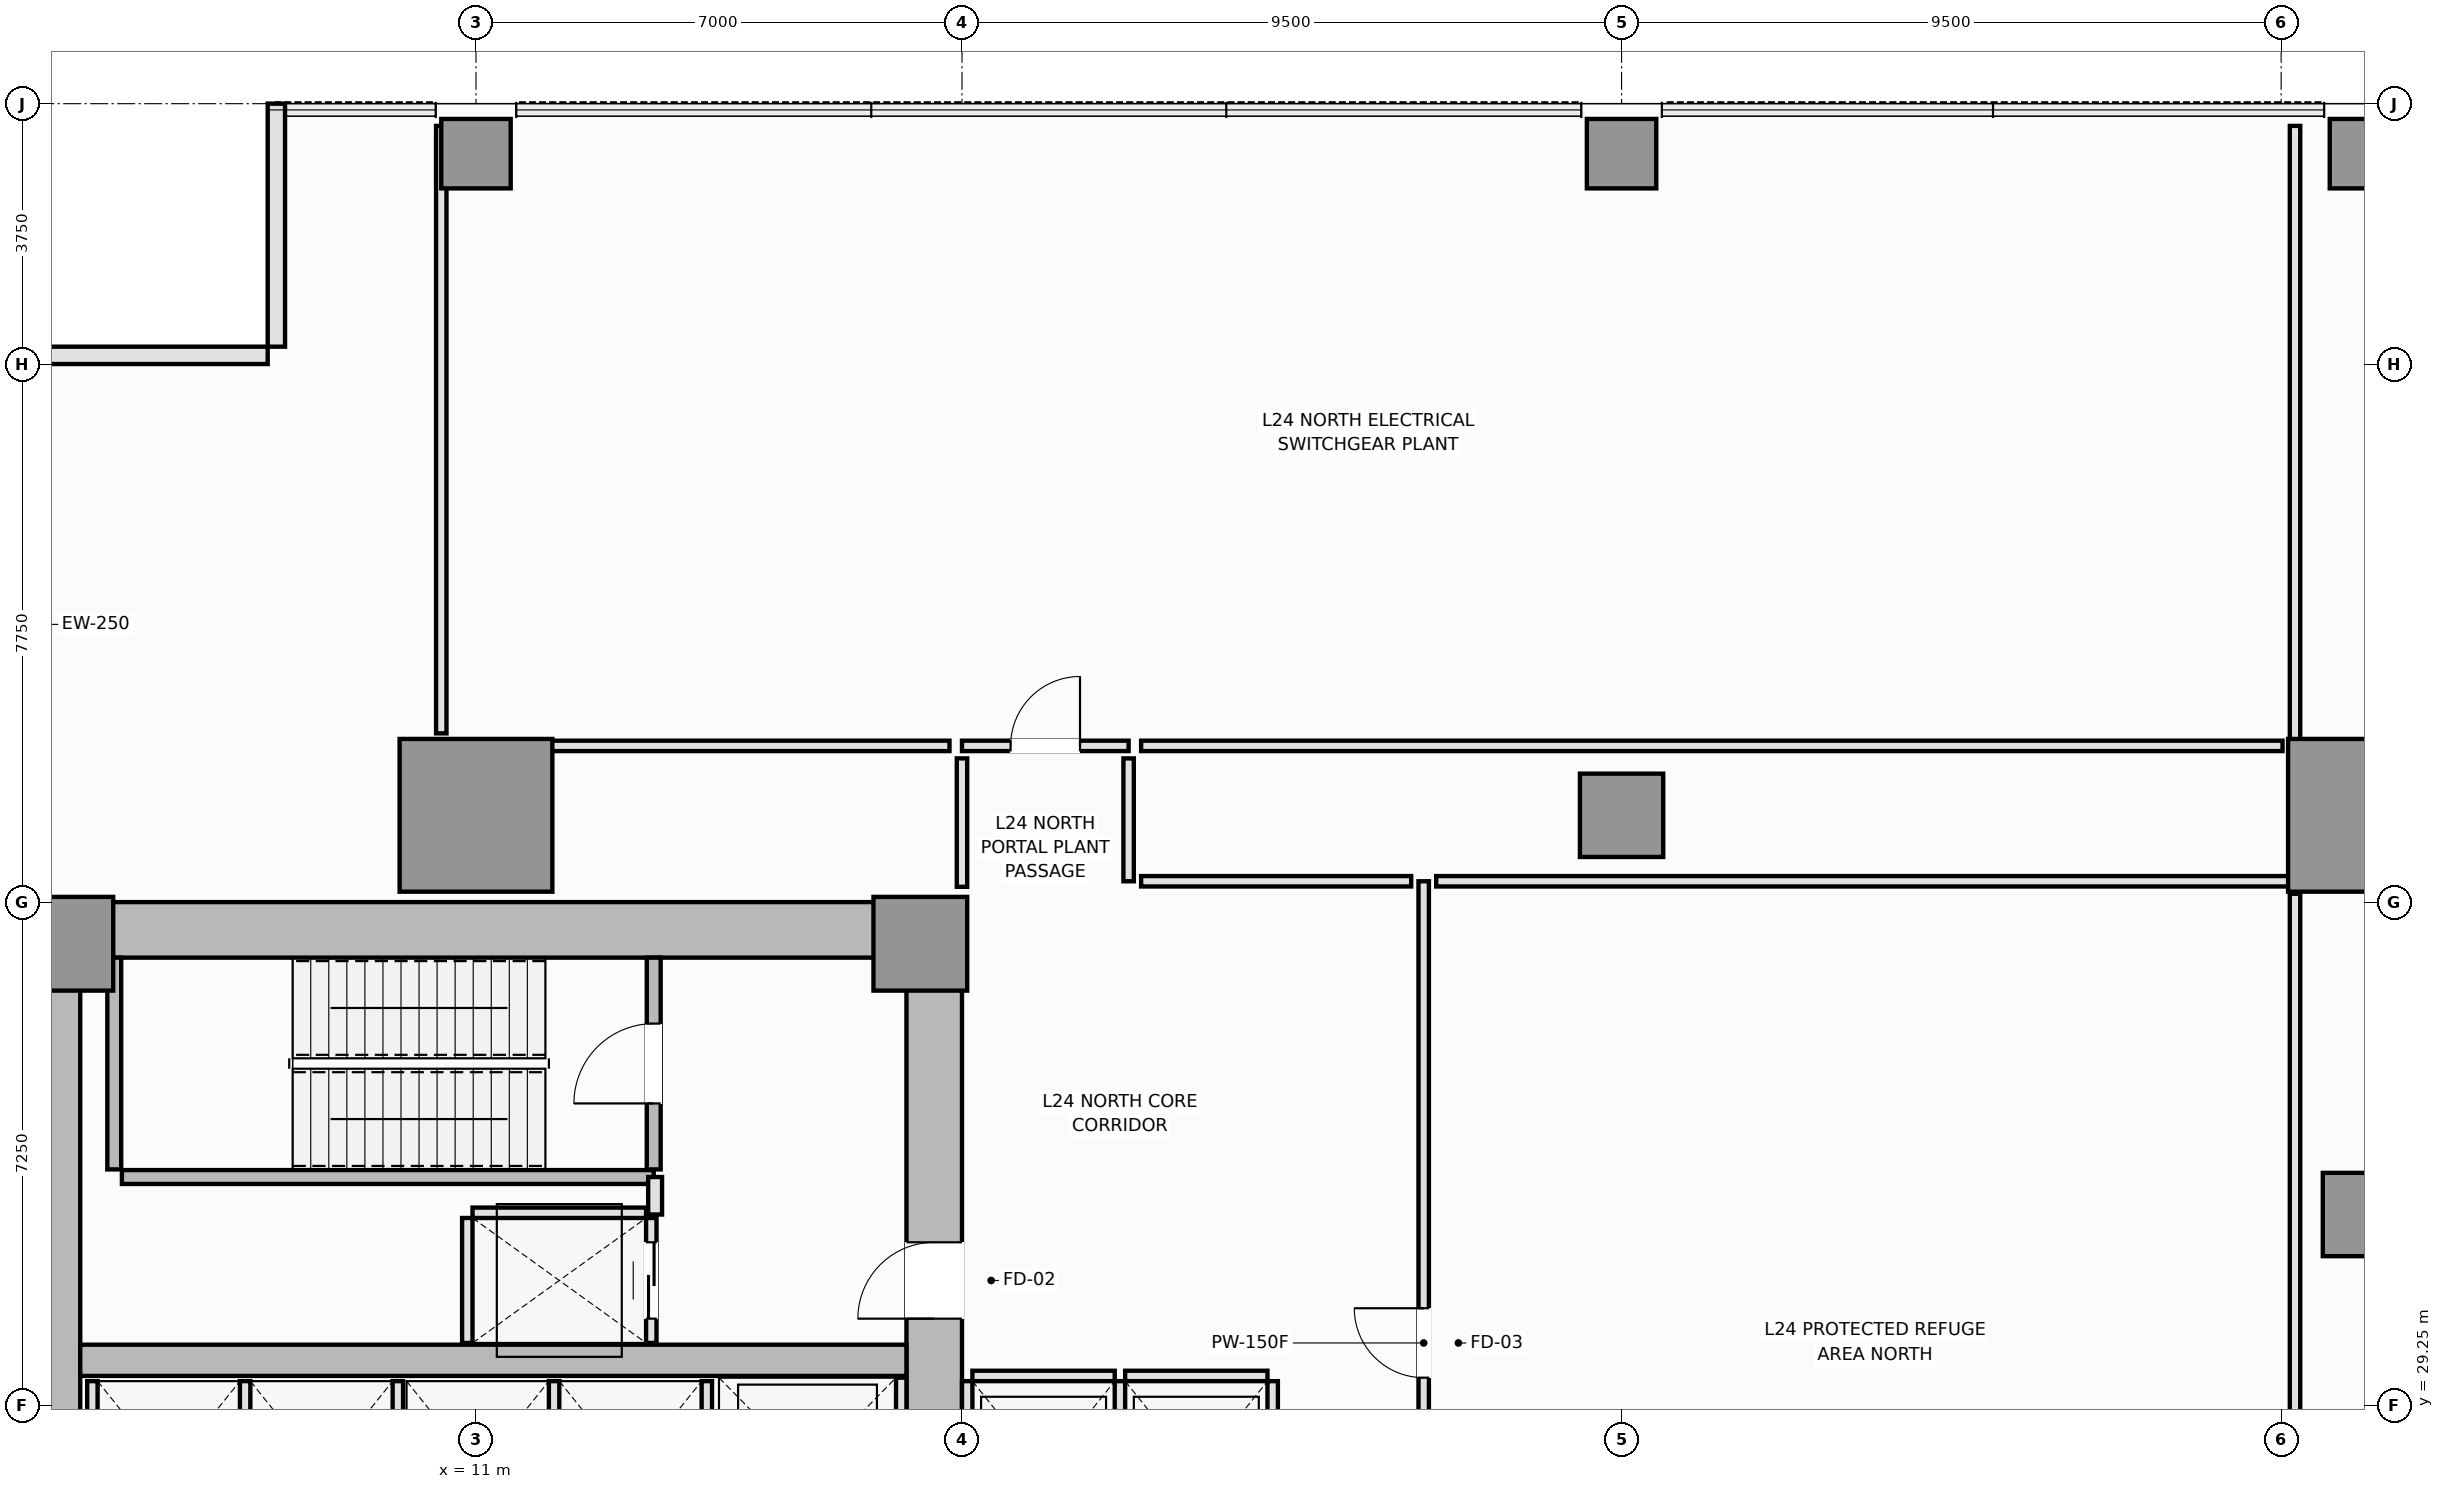
"""IFC4 building model, lengths in metres.
Left out: names, types, materials, properties, quantities, classifications, styles, units other than length and angle.
Written with IfcOpenShell. Run it as: python <this file> out.ifc"""

import sys

from ifc_helpers import new_model, si_unit, direction, frame, frame_2d, origin, origin_2d, place, context, subcontext, project, spatial, rectangle, extrude, element, fill, save


model = new_model("IFC4")
c1 = context("Model", 3, precision=1e-05, world=origin(), true_north=direction((0.0, 1.0)))
c2 = subcontext(c1, "Body", "Model", "MODEL_VIEW")
j1 = project(units=[si_unit("LENGTHUNIT", "METRE"), si_unit("PLANEANGLEUNIT", "RADIAN")], contexts=[c1])
p1 = place(None, origin())
s1 = spatial("IfcSite", under=j1, at=p1, CompositionType="ELEMENT")
p2 = place(p1, origin())
s2 = spatial("IfcBuilding", under=s1, at=p2, CompositionType="ELEMENT")
p3 = place(p2, frame((0.0, 0.0, 93.05)))
s3 = spatial("IfcBuildingStorey", under=s2, at=p3, CompositionType="ELEMENT", Elevation=93.05)
p4 = place(p3, frame((4.5, 36.1, 0.0), z_axis=(0.0, 0.0, 1.0), x_axis=(1.0, 0.0, 0.0)))
e1 = element("IfcWall", 1, at=p4, inside=s3, PredefinedType="SHEAR", context=c2, shape_type="SweptSolid", body=[
    extrude(rectangle(XDim=13.5, YDim=0.8, at=frame_2d((6.75, 0.0))), origin(), (0.0, 0.0, 1.0), 4.8),
])
p5 = place(p3, frame((4.9, 14.8, 0.0), z_axis=(0.0, 0.0, 1.0), x_axis=(0.0, 1.0, 0.0)))
e2 = element("IfcWall", 2, at=p5, inside=s3, PredefinedType="SHEAR", context=c2, shape_type="SweptSolid", body=[
    extrude(rectangle(XDim=20.9, YDim=0.8, at=frame_2d((10.45, 0.0))), origin(), (0.0, 0.0, 1.0), 4.8),
])
p6 = place(p3, frame((17.6, 27.05, 0.0), z_axis=(0.0, 0.0, 1.0), x_axis=(0.0, 1.0, 0.0)))
e3 = element("IfcWall", 3, at=p6, inside=s3, PredefinedType="SHEAR", context=c2, shape_type="SweptSolid", body=[
    extrude(rectangle(XDim=8.65, YDim=0.8, at=frame_2d((4.325, 0.0))), origin(), (0.0, 0.0, 1.0), 4.8),
])
p7 = place(p6, frame((3.45, 0.0, 0.0)))
e4 = element("IfcOpeningElement", 4, at=p7, cuts=e3, PredefinedType="OPENING", context=c2, shape_type="SweptSolid", body=[
    extrude(rectangle(XDim=1.1, YDim=2.15, at=frame_2d((0.55, 1.075))), frame((0.0, 0.41, 0.0), z_axis=(0.0, -1.0, 0.0), x_axis=(1.0, 0.0, 0.0)), (0.0, 0.0, 1.0), 0.82),
])
p8 = place(p3, frame((5.3, 29.9, 0.0), z_axis=(0.0, 0.0, 1.0), x_axis=(1.0, 0.0, 0.0)))
e5 = element("IfcWall", 5, at=p8, inside=s3, PredefinedType="SHEAR", context=c2, shape_type="SweptSolid", body=[
    extrude(rectangle(XDim=11.9, YDim=0.45, at=frame_2d((5.95, 0.0))), origin(), (0.0, 0.0, 1.0), 4.8),
])
for number, where, z_axis, x_axis in (
    (6, (5.1, 35.9, 0.0), (0.0, 0.0, 1.0), (1.0, 0.0, 0.0)),
    (7, (17.4, 35.9, 0.0), (0.0, 0.0, 1.0), (1.0, 0.0, 0.0)),
):
    element("IfcColumn", number, at=place(p3, frame(where, z_axis=z_axis, x_axis=x_axis)), inside=s3, PredefinedType="PILASTER", context=c2, shape_type="SweptSolid", body=[
        extrude(rectangle(XDim=1.35, YDim=1.35, at=origin_2d()), origin(), (0.0, 0.0, 1.0), 4.8),
    ])
for number, where, z_axis, x_axis in (
    (8, (11.0, 37.75, 0.0), (0.0, 0.0, 1.0), (1.0, 0.0, 0.0)),
    (9, (38.2, 37.75, 0.0), (0.0, 0.0, 1.0), (1.0, 0.0, 0.0)),
):
    element("IfcColumn", number, at=place(p3, frame(where, z_axis=z_axis, x_axis=x_axis)), inside=s3, PredefinedType="COLUMN", context=c2, shape_type="SweptSolid", body=[
        extrude(rectangle(XDim=2.2, YDim=2.2, at=origin_2d()), origin(), (0.0, 0.0, 1.0), 4.8),
    ])
for number, where, z_axis, x_axis in (
    (10, (27.5, 37.75, 0.0), (0.0, 0.0, 1.0), (1.0, 0.0, 0.0)),
    (11, (38.2, 32.0, 0.0), (0.0, 0.0, 1.0), (1.0, 0.0, 0.0)),
):
    element("IfcColumn", number, at=place(p3, frame(where, z_axis=z_axis, x_axis=x_axis)), inside=s3, PredefinedType="COLUMN", context=c2, shape_type="SweptSolid", body=[
        extrude(rectangle(XDim=1.2, YDim=1.2, at=origin_2d()), origin(), (0.0, 0.0, 1.0), 4.8),
    ])
for number, where, z_axis, x_axis in (
    (12, (11.0, 47.28, 0.0), (0.0, 0.0, 1.0), (1.0, 0.0, 0.0)),
    (13, (27.5, 47.28, 0.0), (0.0, 0.0, 1.0), (1.0, 0.0, 0.0)),
    (14, (38.2, 47.28, 0.0), (0.0, 0.0, 1.0), (1.0, 0.0, 0.0)),
):
    element("IfcColumn", number, at=place(p3, frame(where, z_axis=z_axis, x_axis=x_axis)), inside=s3, PredefinedType="COLUMN", context=c2, shape_type="SweptSolid", body=[
        extrude(rectangle(XDim=1.0, YDim=1.0, at=origin_2d()), origin(), (0.0, 0.0, 1.0), 4.8),
    ])
for number, where, z_axis, x_axis in (
    (15, (8.125, 48.0, 0.0), (0.0, 0.0, 1.0), (0.0, -1.0, 0.0)),
    (16, (8.0, 44.375, 0.0), (0.0, 0.0, 1.0), (-1.0, 0.0, 0.0)),
):
    element("IfcWall", number, at=place(p3, frame(where, z_axis=z_axis, x_axis=x_axis)), inside=s3, PredefinedType="SOLIDWALL", context=c2, shape_type="SweptSolid", body=[
        extrude(rectangle(XDim=3.5, YDim=0.25, at=frame_2d((1.75, 0.0))), origin(), (0.0, 0.0, 1.0), 4.62),
    ])
p9 = place(p3, frame((5.79, 32.65, 0.0), z_axis=(0.0, 0.0, 1.0), x_axis=(0.0, 1.0, 0.0)))
e17 = element("IfcWall", 17, at=p9, inside=s3, PredefinedType="SOLIDWALL", context=c2, shape_type="SweptSolid", body=[
    extrude(rectangle(XDim=3.05, YDim=0.2, at=frame_2d((1.525, 0.0))), origin(), (0.0, 0.0, 1.0), 4.8),
])
p10 = place(p3, frame((5.9, 32.54, 0.0), z_axis=(0.0, 0.0, 1.0), x_axis=(1.0, 0.0, 0.0)))
e18 = element("IfcWall", 18, at=p10, inside=s3, PredefinedType="SOLIDWALL", context=c2, shape_type="SweptSolid", body=[
    extrude(rectangle(XDim=7.66, YDim=0.2, at=frame_2d((3.83, 0.0))), origin(), (0.0, 0.0, 1.0), 4.8),
])
p11 = place(p3, frame((13.56, 32.65, 0.0), z_axis=(0.0, 0.0, 1.0), x_axis=(0.0, 1.0, 0.0)))
e19 = element("IfcWall", 19, at=p11, inside=s3, PredefinedType="SOLIDWALL", context=c2, shape_type="SweptSolid", body=[
    extrude(rectangle(XDim=3.05, YDim=0.2, at=frame_2d((1.525, 0.0))), origin(), (0.0, 0.0, 1.0), 4.8),
])
p12 = place(p11, frame((0.95, 0.0, 0.0)))
e20 = element("IfcOpeningElement", 20, at=p12, cuts=e19, PredefinedType="OPENING", context=c2, shape_type="SweptSolid", body=[
    extrude(rectangle(XDim=1.15, YDim=2.15, at=frame_2d((0.575, 1.075))), frame((0.0, 0.11, 0.0), z_axis=(0.0, -1.0, 0.0), x_axis=(1.0, 0.0, 0.0)), (0.0, 0.0, 1.0), 0.22),
])
p13 = place(p3, frame((18.15, 29.675, 0.0), z_axis=(0.0, 0.0, 1.0), x_axis=(1.0, 0.0, 0.0)))
e21 = element("IfcWall", 21, at=p13, inside=s3, PredefinedType="PARTITIONING", context=c2, shape_type="SweptSolid", body=[
    extrude(rectangle(XDim=2.05, YDim=0.15, at=frame_2d((1.025, 0.0))), origin(), (0.0, 0.0, 1.0), 4.62),
])
for number, where, z_axis, x_axis in (
    (22, (18.075, 27.05, 0.0), (0.0, 0.0, 1.0), (0.0, 1.0, 0.0)),
    (23, (20.275, 27.05, 0.0), (0.0, 0.0, 1.0), (0.0, 1.0, 0.0)),
):
    element("IfcWall", number, at=place(p3, frame(where, z_axis=z_axis, x_axis=x_axis)), inside=s3, PredefinedType="PARTITIONING", context=c2, shape_type="SweptSolid", body=[
        extrude(rectangle(XDim=2.55, YDim=0.15, at=frame_2d((1.275, 0.0))), origin(), (0.0, 0.0, 1.0), 4.62),
    ])
p14 = place(p3, frame((20.35, 29.675, 0.0), z_axis=(0.0, 0.0, 1.0), x_axis=(1.0, 0.0, 0.0)))
e24 = element("IfcWall", 24, at=p14, inside=s3, PredefinedType="PARTITIONING", context=c2, shape_type="SweptSolid", body=[
    extrude(rectangle(XDim=2.05, YDim=0.15, at=frame_2d((1.025, 0.0))), origin(), (0.0, 0.0, 1.0), 4.62),
])
for number, where, z_axis, x_axis in (
    (25, (22.475, 27.05, 0.0), (0.0, 0.0, 1.0), (0.0, 1.0, 0.0)),
    (26, (5.475, 27.05, 0.0), (0.0, 0.0, 1.0), (0.0, 1.0, 0.0)),
    (27, (7.675, 27.05, 0.0), (0.0, 0.0, 1.0), (0.0, 1.0, 0.0)),
    (28, (9.875, 27.05, 0.0), (0.0, 0.0, 1.0), (0.0, 1.0, 0.0)),
    (29, (12.125, 27.05, 0.0), (0.0, 0.0, 1.0), (0.0, 1.0, 0.0)),
    (30, (14.325, 27.05, 0.0), (0.0, 0.0, 1.0), (0.0, 1.0, 0.0)),
):
    element("IfcWall", number, at=place(p3, frame(where, z_axis=z_axis, x_axis=x_axis)), inside=s3, PredefinedType="PARTITIONING", context=c2, shape_type="SweptSolid", body=[
        extrude(rectangle(XDim=2.55, YDim=0.15, at=frame_2d((1.275, 0.0))), origin(), (0.0, 0.0, 1.0), 4.62),
    ])
p15 = place(p3, frame((17.125, 27.05, 0.0), z_axis=(0.0, 0.0, 1.0), x_axis=(0.0, 1.0, 0.0)))
e31 = element("IfcWall", 31, at=p15, inside=s3, PredefinedType="PARTITIONING", context=c2, shape_type="SweptSolid", body=[
    extrude(rectangle(XDim=2.6, YDim=0.15, at=frame_2d((1.3, 0.0))), origin(), (0.0, 0.0, 1.0), 4.62),
])
p16 = place(p3, frame((10.95, 32.025, 0.0), z_axis=(0.0, 0.0, 1.0), x_axis=(1.0, 0.0, 0.0)))
e32 = element("IfcWall", 32, at=p16, inside=s3, PredefinedType="PARTITIONING", context=c2, shape_type="SweptSolid", body=[
    extrude(rectangle(XDim=2.5, YDim=0.15, at=frame_2d((1.25, 0.0))), origin(), (0.0, 0.0, 1.0), 4.62),
])
p17 = place(p3, frame((10.875, 30.15, 0.0), z_axis=(0.0, 0.0, 1.0), x_axis=(0.0, 1.0, 0.0)))
e33 = element("IfcWall", 33, at=p17, inside=s3, PredefinedType="PARTITIONING", context=c2, shape_type="SweptSolid", body=[
    extrude(rectangle(XDim=1.8, YDim=0.15, at=frame_2d((0.9, 0.0))), origin(), (0.0, 0.0, 1.0), 4.62),
])
p18 = place(p3, frame((13.525, 30.15, 0.0), z_axis=(0.0, 0.0, 1.0), x_axis=(0.0, 1.0, 0.0)))
e34 = element("IfcWall", 34, at=p18, inside=s3, PredefinedType="PARTITIONING", context=c2, shape_type="SweptSolid", body=[
    extrude(rectangle(XDim=1.8, YDim=0.15, at=frame_2d((0.9, 0.0))), origin(), (0.0, 0.0, 1.0), 4.62),
])
p19 = place(p18, frame((0.35, 0.0, 0.0)))
e35 = element("IfcOpeningElement", 35, at=p19, cuts=e34, PredefinedType="OPENING", context=c2, shape_type="SweptSolid", body=[
    extrude(rectangle(XDim=1.1, YDim=2.2, at=frame_2d((0.55, 1.1))), frame((0.0, 0.085, 0.0), z_axis=(0.0, -1.0, 0.0), x_axis=(1.0, 0.0, 0.0)), (0.0, 0.0, 1.0), 0.17),
])
p20 = place(p3, frame((13.58, 32.0, 0.0), z_axis=(0.0, 0.0, 1.0), x_axis=(0.0, 1.0, 0.0)))
e36 = element("IfcWall", 36, at=p20, inside=s3, PredefinedType="PARTITIONING", context=c2, shape_type="SweptSolid", body=[
    extrude(rectangle(XDim=0.54, YDim=0.2, at=frame_2d((0.27, 0.0))), origin(), (0.0, 0.0, 1.0), 4.62),
])
p21 = place(p3, frame((24.65, 23.5, 0.0), z_axis=(0.0, 0.0, 1.0), x_axis=(0.0, 1.0, 0.0)))
e37 = element("IfcWall", 37, at=p21, inside=s3, PredefinedType="PARTITIONING", context=c2, shape_type="SweptSolid", body=[
    extrude(rectangle(XDim=13.3, YDim=0.15, at=frame_2d((6.65, 0.0))), origin(), (0.0, 0.0, 1.0), 4.62),
])
p22 = place(p21, frame((6.15, 0.0, 0.0)))
e38 = element("IfcOpeningElement", 38, at=p22, cuts=e37, PredefinedType="OPENING", context=c2, shape_type="SweptSolid", body=[
    extrude(rectangle(XDim=1.0, YDim=2.15, at=frame_2d((0.5, 1.075))), frame((0.0, 0.085, 0.0), z_axis=(0.0, -1.0, 0.0), x_axis=(1.0, 0.0, 0.0)), (0.0, 0.0, 1.0), 0.17),
])
p23 = place(p3, frame((18.0, 38.75, 0.0), z_axis=(0.0, 0.0, 1.0), x_axis=(1.0, 0.0, 0.0)))
e39 = element("IfcWall", 39, at=p23, inside=s3, PredefinedType="PARTITIONING", context=c2, shape_type="SweptSolid", body=[
    extrude(rectangle(XDim=2.4, YDim=0.15, at=frame_2d((1.2, 0.0))), origin(), (0.0, 0.0, 1.0), 4.62),
])
p24 = place(p23, frame((0.7, 0.0, 0.0)))
e40 = element("IfcOpeningElement", 40, at=p24, cuts=e39, PredefinedType="OPENING", context=c2, shape_type="SweptSolid", body=[
    extrude(rectangle(XDim=1.0, YDim=2.15, at=frame_2d((0.5, 1.075))), frame((0.0, 0.085, 0.0), z_axis=(0.0, -1.0, 0.0), x_axis=(1.0, 0.0, 0.0)), (0.0, 0.0, 1.0), 0.17),
])
p25 = place(p3, frame((18.0, 36.72, 0.0), z_axis=(0.0, 0.0, 1.0), x_axis=(0.0, 1.0, 0.0)))
e41 = element("IfcWall", 41, at=p25, inside=s3, PredefinedType="PARTITIONING", context=c2, shape_type="SweptSolid", body=[
    extrude(rectangle(XDim=1.85, YDim=0.15, at=frame_2d((0.925, 0.0))), origin(), (0.0, 0.0, 1.0), 4.62),
])
p26 = place(p3, frame((17.82, 38.75, 0.0), z_axis=(0.0, 0.0, 1.0), x_axis=(-1.0, 0.0, 0.0)))
e42 = element("IfcWall", 42, at=p26, inside=s3, PredefinedType="PARTITIONING", context=c2, shape_type="SweptSolid", body=[
    extrude(rectangle(XDim=7.32, YDim=0.15, at=frame_2d((3.66, 0.0))), origin(), (0.0, 0.0, 1.0), 4.62),
])
p27 = place(p3, frame((10.5, 38.93, 0.0), z_axis=(0.0, 0.0, 1.0), x_axis=(0.0, 1.0, 0.0)))
e43 = element("IfcWall", 43, at=p27, inside=s3, PredefinedType="PARTITIONING", context=c2, shape_type="SweptSolid", body=[
    extrude(rectangle(XDim=8.75, YDim=0.15, at=frame_2d((4.375, 0.0))), origin(), (0.0, 0.0, 1.0), 2.6),
])
p28 = place(p3, frame((37.2, 47.68, 0.0), z_axis=(0.0, 0.0, 1.0), x_axis=(0.0, -1.0, 0.0)))
e44 = element("IfcWall", 44, at=p28, inside=s3, PredefinedType="PARTITIONING", context=c2, shape_type="SweptSolid", body=[
    extrude(rectangle(XDim=8.93, YDim=0.15, at=frame_2d((4.465, 0.0))), origin(), (0.0, 0.0, 1.0), 4.62),
])
p29 = place(p3, frame((37.02, 38.75, 0.0), z_axis=(0.0, 0.0, 1.0), x_axis=(-1.0, 0.0, 0.0)))
e45 = element("IfcWall", 45, at=p29, inside=s3, PredefinedType="PARTITIONING", context=c2, shape_type="SweptSolid", body=[
    extrude(rectangle(XDim=16.44, YDim=0.15, at=frame_2d((8.22, 0.0))), origin(), (0.0, 0.0, 1.0), 4.62),
])
p30 = place(p3, frame((20.4, 38.57, 0.0), z_axis=(0.0, 0.0, 1.0), x_axis=(0.0, -1.0, 0.0)))
e46 = element("IfcWall", 46, at=p30, inside=s3, PredefinedType="PARTITIONING", context=c2, shape_type="SweptSolid", body=[
    extrude(rectangle(XDim=1.77, YDim=0.15, at=frame_2d((0.885, 0.0))), origin(), (0.0, 0.0, 1.0), 4.62),
])
p31 = place(p3, frame((20.58, 36.8, 0.0), z_axis=(0.0, 0.0, 1.0), x_axis=(1.0, 0.0, 0.0)))
e47 = element("IfcWall", 47, at=p31, inside=s3, PredefinedType="PARTITIONING", context=c2, shape_type="SweptSolid", body=[
    extrude(rectangle(XDim=3.89, YDim=0.15, at=frame_2d((1.945, 0.0))), origin(), (0.0, 0.0, 1.0), 4.62),
])
p32 = place(p3, frame((24.83, 36.8, 0.0), z_axis=(0.0, 0.0, 1.0), x_axis=(1.0, 0.0, 0.0)))
e48 = element("IfcWall", 48, at=p32, inside=s3, PredefinedType="PARTITIONING", context=c2, shape_type="SweptSolid", body=[
    extrude(rectangle(XDim=12.37, YDim=0.15, at=frame_2d((6.185, 0.0))), origin(), (0.0, 0.0, 1.0), 4.62),
])
p33 = place(p3, frame((37.2, 36.62, 0.0), z_axis=(0.0, 0.0, 1.0), x_axis=(0.0, -1.0, 0.0)))
e49 = element("IfcWall", 49, at=p33, inside=s3, PredefinedType="PARTITIONING", context=c2, shape_type="SweptSolid", body=[
    extrude(rectangle(XDim=12.94, YDim=0.15, at=frame_2d((6.47, 0.0))), origin(), (0.0, 0.0, 1.0), 4.62),
])
p34 = place(p12, origin())
e50 = element("IfcDoor", 50, at=p34, inside=s3, OperationType="SINGLE_SWING_LEFT", PredefinedType="DOOR", context=c2, shape_type="SweptSolid", body=[
    extrude(rectangle(XDim=1.15, YDim=2.15, at=frame_2d((0.575, 1.075))), frame((0.0, 0.025, 0.0), z_axis=(0.0, -1.0, 0.0), x_axis=(1.0, 0.0, 0.0)), (0.0, 0.0, 1.0), 0.05),
])
fill(e20, e50)
p35 = place(p19, origin())
e51 = element("IfcDoor", 51, at=p35, inside=s3, OperationType="DOUBLE_DOOR_SLIDING", PredefinedType="DOOR", context=c2, shape_type="SweptSolid", body=[
    extrude(rectangle(XDim=1.1, YDim=2.2, at=frame_2d((0.55, 1.1))), frame((0.0, 0.025, 0.0), z_axis=(0.0, -1.0, 0.0), x_axis=(1.0, 0.0, 0.0)), (0.0, 0.0, 1.0), 0.05),
])
fill(e35, e51)
p36 = place(p7, origin())
e52 = element("IfcDoor", 52, at=p36, inside=s3, OperationType="SINGLE_SWING_LEFT", PredefinedType="DOOR", context=c2, shape_type="SweptSolid", body=[
    extrude(rectangle(XDim=1.1, YDim=2.15, at=frame_2d((0.55, 1.075))), frame((0.0, 0.025, 0.0), z_axis=(0.0, -1.0, 0.0), x_axis=(1.0, 0.0, 0.0)), (0.0, 0.0, 1.0), 0.05),
])
fill(e4, e52)
p37 = place(p22, origin())
e53 = element("IfcDoor", 53, at=p37, inside=s3, OperationType="SINGLE_SWING_RIGHT", PredefinedType="DOOR", context=c2, shape_type="SweptSolid", body=[
    extrude(rectangle(XDim=1.0, YDim=2.15, at=frame_2d((0.5, 1.075))), frame((0.0, 0.025, 0.0), z_axis=(0.0, -1.0, 0.0), x_axis=(1.0, 0.0, 0.0)), (0.0, 0.0, 1.0), 0.05),
])
fill(e38, e53)
p38 = place(p24, origin())
e54 = element("IfcDoor", 54, at=p38, inside=s3, OperationType="SINGLE_SWING_RIGHT", PredefinedType="DOOR", context=c2, shape_type="SweptSolid", body=[
    extrude(rectangle(XDim=1.0, YDim=2.15, at=frame_2d((0.5, 1.075))), frame((0.0, 0.025, 0.0), z_axis=(0.0, -1.0, 0.0), x_axis=(1.0, 0.0, 0.0)), (0.0, 0.0, 1.0), 0.05),
])
fill(e40, e54)
save(model, sys.argv[1])
